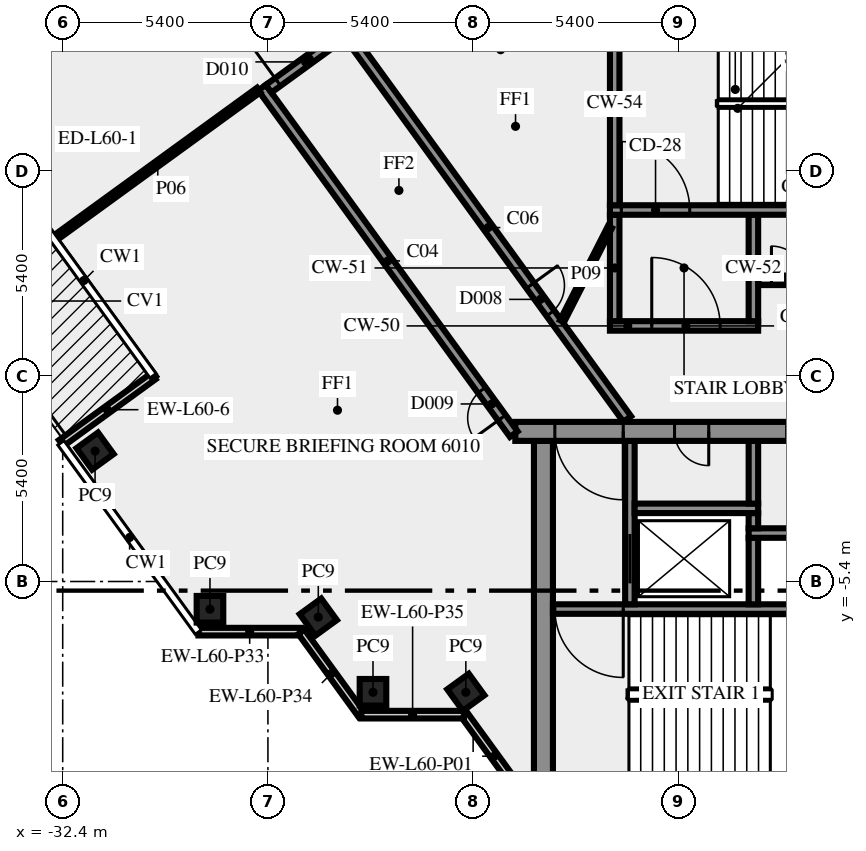
"""IFC4 building model, lengths in metres.
Left out: names, types, materials, properties, quantities, classifications, styles, units other than length and angle.
Written with IfcOpenShell. Run it as: python <this file> out.ifc"""

import sys

from ifc_helpers import new_model, si_unit, direction, frame, frame_2d, origin, origin_2d, place, context, subcontext, project, spatial, rectangle, extrude, element, fill, save


model = new_model("IFC4")
c1 = context("Model", 3, precision=1e-05, world=origin(), true_north=direction((0.0, 1.0)))
c2 = subcontext(c1, "Body", "Model", "MODEL_VIEW")
j1 = project(units=[si_unit("LENGTHUNIT", "METRE"), si_unit("PLANEANGLEUNIT", "RADIAN")], contexts=[c1])
p1 = place(None, origin())
s1 = spatial("IfcSite", under=j1, at=p1, CompositionType="ELEMENT")
p2 = place(p1, origin())
s2 = spatial("IfcBuilding", under=s1, at=p2, CompositionType="ELEMENT")
p3 = place(p2, frame((0.0, 0.0, 257.0)))
s3 = spatial("IfcBuildingStorey", under=s2, at=p3, CompositionType="ELEMENT", Elevation=257.0)
for number, where, z_axis, x_axis in (
    (1, (-31.548, -1.969, 0.0), (0.0, 0.0, 1.0), (0.588, -0.809, 0.0)),
    (2, (-28.525, -6.13, 0.0), (0.0, 0.0, 1.0), (1.0, 0.0, 0.0)),
    (3, (-25.674, -6.337, 0.0), (0.0, 0.0, 1.0), (0.588, -0.809, 0.0)),
    (4, (-24.235, -8.315, 0.0), (0.0, 0.0, 1.0), (1.0, 0.0, 0.0)),
    (5, (-21.792, -8.315, 0.0), (0.0, 0.0, 1.0), (0.588, -0.809, 0.0)),
):
    element("IfcColumn", number, at=place(p3, frame(where, z_axis=z_axis, x_axis=x_axis)), inside=s3, PredefinedType="COLUMN", context=c2, shape_type="SweptSolid", body=[
        extrude(rectangle(XDim=0.7, YDim=0.7, at=origin_2d()), origin(), (0.0, 0.0, 1.0), 3.65),
    ])
p4 = place(p3, frame((-30.014, 0.002, 0.0), z_axis=(0.0, 0.0, 1.0), x_axis=(-0.808999938455, -0.587808727036, 0.0)))
e6 = element("IfcWall", 6, at=p4, inside=s3, PredefinedType="SOLIDWALL", context=c2, shape_type="SweptSolid", body=[
    extrude(rectangle(XDim=3.0, YDim=0.2, at=frame_2d((1.5, 0.0))), origin(), (0.0, 0.0, 1.0), 3.65),
])
p5 = place(p3, frame((-21.833, -8.909, 0.0), z_axis=(0.0, 0.0, 1.0), x_axis=(0.587766567315, -0.809030569476, 0.0)))
e7 = element("IfcWall", 7, at=p5, inside=s3, PredefinedType="SOLIDWALL", context=c2, shape_type="SweptSolid", body=[
    extrude(rectangle(XDim=2.688, YDim=0.2, at=frame_2d((1.344, 0.0))), origin(), (0.0, 0.0, 1.0), 3.65),
])
p6 = place(p3, frame((-28.83, -6.719, 0.0), z_axis=(0.0, 0.0, 1.0), x_axis=(1.0, 0.0, 0.0)))
e8 = element("IfcWall", 8, at=p6, inside=s3, PredefinedType="SOLIDWALL", context=c2, shape_type="SweptSolid", body=[
    extrude(rectangle(XDim=2.7, YDim=0.2, at=frame_2d((1.35, 0.0))), origin(), (0.0, 0.0, 1.0), 3.65),
])
p7 = place(p3, frame((-26.12, -6.724, 0.0), z_axis=(0.0, 0.0, 1.0), x_axis=(0.587720002413, -0.809064397168, 0.0)))
e9 = element("IfcWall", 9, at=p7, inside=s3, PredefinedType="SOLIDWALL", context=c2, shape_type="SweptSolid", body=[
    extrude(rectangle(XDim=2.7, YDim=0.2, at=frame_2d((1.35, 0.0))), origin(), (0.0, 0.0, 1.0), 3.65),
])
p8 = place(p3, frame((-24.543, -8.904, 0.0), z_axis=(0.0, 0.0, 1.0), x_axis=(1.0, 0.0, 0.0)))
e10 = element("IfcWall", 10, at=p8, inside=s3, PredefinedType="SOLIDWALL", context=c2, shape_type="SweptSolid", body=[
    extrude(rectangle(XDim=2.7, YDim=0.2, at=frame_2d((1.35, 0.0))), origin(), (0.0, 0.0, 1.0), 3.65),
])
p9 = place(p3, frame((-19.75, -10.5, 0.0), z_axis=(0.0, 0.0, 1.0), x_axis=(0.0, 1.0, 0.0)))
e11 = element("IfcWall", 11, at=p9, inside=s3, PredefinedType="SHEAR", context=c2, shape_type="SweptSolid", body=[
    extrude(rectangle(XDim=8.8, YDim=0.5, at=frame_2d((4.4, 0.0))), origin(), (0.0, 0.0, 1.0), 3.65),
])
p10 = place(p3, frame((-11.45, -6.125, 0.0), z_axis=(0.0, 0.0, 1.0), x_axis=(-1.0, 0.0, 0.0)))
e12 = element("IfcWall", 12, at=p10, inside=s3, PredefinedType="SHEAR", context=c2, shape_type="SweptSolid", body=[
    extrude(rectangle(XDim=8.05, YDim=0.25, at=frame_2d((4.025, 0.0))), origin(), (0.0, 0.0, 1.0), 3.65),
])
p11 = place(p10, frame((6.2, 0.0, 0.0)))
e13 = element("IfcOpeningElement", 13, at=p11, cuts=e12, PredefinedType="OPENING", context=c2, shape_type="SweptSolid", body=[
    extrude(rectangle(XDim=1.8, YDim=2.1, at=frame_2d((0.9, 1.05))), frame((0.0, 0.135, 0.0), z_axis=(0.0, -1.0, 0.0), x_axis=(1.0, 0.0, 0.0)), (0.0, 0.0, 1.0), 0.27),
])
p12 = place(p3, frame((-17.475, -6.0, 0.0), z_axis=(0.0, 0.0, 1.0), x_axis=(0.0, 1.0, 0.0)))
e14 = element("IfcWall", 14, at=p12, inside=s3, PredefinedType="SHEAR", context=c2, shape_type="SweptSolid", body=[
    extrude(rectangle(XDim=4.3, YDim=0.25, at=frame_2d((2.15, 0.0))), origin(), (0.0, 0.0, 1.0), 3.65),
])
p13 = place(p12, frame((0.55, 0.0, 0.0)))
e15 = element("IfcOpeningElement", 15, at=p13, cuts=e14, PredefinedType="OPENING", context=c2, shape_type="SweptSolid", body=[
    extrude(rectangle(XDim=1.3, YDim=2.1, at=frame_2d((0.65, 1.05))), frame((0.0, 0.135, 0.0), z_axis=(0.0, -1.0, 0.0), x_axis=(1.0, 0.0, 0.0)), (0.0, 0.0, 1.0), 0.27),
])
p14 = place(p3, frame((-14.225, -6.0, 0.0), z_axis=(0.0, 0.0, 1.0), x_axis=(0.0, 1.0, 0.0)))
e16 = element("IfcWall", 16, at=p14, inside=s3, PredefinedType="SHEAR", context=c2, shape_type="SweptSolid", body=[
    extrude(rectangle(XDim=1.75, YDim=0.25, at=frame_2d((0.875, 0.0))), origin(), (0.0, 0.0, 1.0), 3.65),
])
p15 = place(p3, frame((-14.35, -4.125, 0.0), z_axis=(0.0, 0.0, 1.0), x_axis=(1.0, 0.0, 0.0)))
e17 = element("IfcWall", 17, at=p15, inside=s3, PredefinedType="SHEAR", context=c2, shape_type="SweptSolid", body=[
    extrude(rectangle(XDim=10.4, YDim=0.25, at=frame_2d((5.2, 0.0))), origin(), (0.0, 0.0, 1.0), 3.65),
])
p16 = place(p15, frame((4.75, 0.0, 0.0)))
e18 = element("IfcOpeningElement", 18, at=p16, cuts=e17, PredefinedType="OPENING", context=c2, shape_type="SweptSolid", body=[
    extrude(rectangle(XDim=1.1, YDim=2.1, at=frame_2d((0.55, 1.05))), frame((0.0, 0.135, 0.0), z_axis=(0.0, -1.0, 0.0), x_axis=(1.0, 0.0, 0.0)), (0.0, 0.0, 1.0), 0.27),
])
p17 = place(p15, frame((7.25, 0.0, 0.0)))
e19 = element("IfcOpeningElement", 19, at=p17, cuts=e17, PredefinedType="OPENING", context=c2, shape_type="SweptSolid", body=[
    extrude(rectangle(XDim=1.1, YDim=2.1, at=frame_2d((0.55, 1.05))), frame((0.0, 0.135, 0.0), z_axis=(0.0, -1.0, 0.0), x_axis=(1.0, 0.0, 0.0)), (0.0, 0.0, 1.0), 0.27),
])
p18 = place(p3, frame((-14.225, -4.0, 0.0), z_axis=(0.0, 0.0, 1.0), x_axis=(0.0, 1.0, 0.0)))
e20 = element("IfcWall", 20, at=p18, inside=s3, PredefinedType="SHEAR", context=c2, shape_type="SweptSolid", body=[
    extrude(rectangle(XDim=0.4, YDim=0.25, at=frame_2d((0.2, 0.0))), origin(), (0.0, 0.0, 1.0), 3.65),
])
p19 = place(p3, frame((-17.35, -3.475, 0.0), z_axis=(0.0, 0.0, 1.0), x_axis=(1.0, 0.0, 0.0)))
e21 = element("IfcWall", 21, at=p19, inside=s3, PredefinedType="SHEAR", context=c2, shape_type="SweptSolid", body=[
    extrude(rectangle(XDim=3.25, YDim=0.25, at=frame_2d((1.625, 0.0))), origin(), (0.0, 0.0, 1.0), 3.65),
])
p20 = place(p3, frame((-14.225, -3.35, 0.0), z_axis=(0.0, 0.0, 1.0), x_axis=(0.0, 1.0, 0.0)))
e22 = element("IfcWall", 22, at=p20, inside=s3, PredefinedType="SHEAR", context=c2, shape_type="SweptSolid", body=[
    extrude(rectangle(XDim=1.65, YDim=0.25, at=frame_2d((0.825, 0.0))), origin(), (0.0, 0.0, 1.0), 3.65),
])
p21 = place(p3, frame((20.49, -1.45, 0.0), z_axis=(0.0, 0.0, 1.0), x_axis=(-1.0, 0.0, 0.0)))
e23 = element("IfcWall", 23, at=p21, inside=s3, PredefinedType="SHEAR", context=c2, shape_type="SweptSolid", body=[
    extrude(rectangle(XDim=40.98, YDim=0.5, at=frame_2d((20.49, 0.0))), origin(), (0.0, 0.0, 1.0), 3.65),
])
p22 = place(p21, frame((38.14, 0.0, 0.0)))
e24 = element("IfcOpeningElement", 24, at=p22, cuts=e23, PredefinedType="OPENING", context=c2, shape_type="SweptSolid", body=[
    extrude(rectangle(XDim=1.8, YDim=2.1, at=frame_2d((0.9, 1.05))), frame((0.0, 0.26, 0.0), z_axis=(0.0, -1.0, 0.0), x_axis=(1.0, 0.0, 0.0)), (0.0, 0.0, 1.0), 0.52),
])
p23 = place(p21, frame((35.89, 0.0, 0.0)))
e25 = element("IfcOpeningElement", 25, at=p23, cuts=e23, PredefinedType="OPENING", context=c2, shape_type="SweptSolid", body=[
    extrude(rectangle(XDim=0.9, YDim=2.1, at=frame_2d((0.45, 1.05))), frame((0.0, 0.26, 0.0), z_axis=(0.0, -1.0, 0.0), x_axis=(1.0, 0.0, 0.0)), (0.0, 0.0, 1.0), 0.52),
])
p24 = place(p21, frame((32.94, 0.0, 0.0)))
e26 = element("IfcOpeningElement", 26, at=p24, cuts=e23, PredefinedType="OPENING", context=c2, shape_type="SweptSolid", body=[
    extrude(rectangle(XDim=0.9, YDim=2.1, at=frame_2d((0.45, 1.05))), frame((0.0, 0.26, 0.0), z_axis=(0.0, -1.0, 0.0), x_axis=(1.0, 0.0, 0.0)), (0.0, 0.0, 1.0), 0.52),
])
p25 = place(p21, frame((31.015, 0.0, 0.0)))
e27 = element("IfcOpeningElement", 27, at=p25, cuts=e23, PredefinedType="OPENING", context=c2, shape_type="SweptSolid", body=[
    extrude(rectangle(XDim=0.8, YDim=2.1, at=frame_2d((0.4, 1.05))), frame((0.0, 0.26, 0.0), z_axis=(0.0, -1.0, 0.0), x_axis=(1.0, 0.0, 0.0)), (0.0, 0.0, 1.0), 0.52),
])
p26 = place(p21, frame((24.765, 0.0, 0.0)))
e28 = element("IfcOpeningElement", 28, at=p26, cuts=e23, PredefinedType="OPENING", context=c2, shape_type="SweptSolid", body=[
    extrude(rectangle(XDim=0.8, YDim=2.1, at=frame_2d((0.4, 1.05))), frame((0.0, 0.26, 0.0), z_axis=(0.0, -1.0, 0.0), x_axis=(1.0, 0.0, 0.0)), (0.0, 0.0, 1.0), 0.52),
])
p27 = place(p21, frame((21.765, 0.0, 0.0)))
e29 = element("IfcOpeningElement", 29, at=p27, cuts=e23, PredefinedType="OPENING", context=c2, shape_type="SweptSolid", body=[
    extrude(rectangle(XDim=2.0, YDim=2.1, at=frame_2d((1.0, 1.05))), frame((0.0, 0.26, 0.0), z_axis=(0.0, -1.0, 0.0), x_axis=(1.0, 0.0, 0.0)), (0.0, 0.0, 1.0), 0.52),
])
p28 = place(p21, frame((14.202, 0.0, 0.0)))
e30 = element("IfcOpeningElement", 30, at=p28, cuts=e23, PredefinedType="OPENING", context=c2, shape_type="SweptSolid", body=[
    extrude(rectangle(XDim=0.9, YDim=2.1, at=frame_2d((0.45, 1.05))), frame((0.0, 0.26, 0.0), z_axis=(0.0, -1.0, 0.0), x_axis=(1.0, 0.0, 0.0)), (0.0, 0.0, 1.0), 0.52),
])
p29 = place(p21, frame((10.478, 0.0, 0.0)))
e31 = element("IfcOpeningElement", 31, at=p29, cuts=e23, PredefinedType="OPENING", context=c2, shape_type="SweptSolid", body=[
    extrude(rectangle(XDim=0.9, YDim=2.1, at=frame_2d((0.45, 1.05))), frame((0.0, 0.26, 0.0), z_axis=(0.0, -1.0, 0.0), x_axis=(1.0, 0.0, 0.0)), (0.0, 0.0, 1.0), 0.52),
])
p30 = place(p21, frame((7.14, 0.0, 0.0)))
e32 = element("IfcOpeningElement", 32, at=p30, cuts=e23, PredefinedType="OPENING", context=c2, shape_type="SweptSolid", body=[
    extrude(rectangle(XDim=0.9, YDim=2.1, at=frame_2d((0.45, 1.05))), frame((0.0, 0.26, 0.0), z_axis=(0.0, -1.0, 0.0), x_axis=(1.0, 0.0, 0.0)), (0.0, 0.0, 1.0), 0.52),
])
p31 = place(p21, frame((5.028, 0.0, 0.0)))
e33 = element("IfcOpeningElement", 33, at=p31, cuts=e23, PredefinedType="OPENING", context=c2, shape_type="SweptSolid", body=[
    extrude(rectangle(XDim=0.8, YDim=2.1, at=frame_2d((0.4, 1.05))), frame((0.0, 0.26, 0.0), z_axis=(0.0, -1.0, 0.0), x_axis=(1.0, 0.0, 0.0)), (0.0, 0.0, 1.0), 0.52),
])
p32 = place(p21, frame((3.452, 0.0, 0.0)))
e34 = element("IfcOpeningElement", 34, at=p32, cuts=e23, PredefinedType="OPENING", context=c2, shape_type="SweptSolid", body=[
    extrude(rectangle(XDim=0.8, YDim=2.1, at=frame_2d((0.4, 1.05))), frame((0.0, 0.26, 0.0), z_axis=(0.0, -1.0, 0.0), x_axis=(1.0, 0.0, 0.0)), (0.0, 0.0, 1.0), 0.52),
])
p33 = place(p21, frame((1.04, 0.0, 0.0)))
e35 = element("IfcOpeningElement", 35, at=p33, cuts=e23, PredefinedType="OPENING", context=c2, shape_type="SweptSolid", body=[
    extrude(rectangle(XDim=1.8, YDim=2.1, at=frame_2d((0.9, 1.05))), frame((0.0, 0.26, 0.0), z_axis=(0.0, -1.0, 0.0), x_axis=(1.0, 0.0, 0.0)), (0.0, 0.0, 1.0), 0.52),
])
p34 = place(p3, frame((-18.0, 1.325, 0.0), z_axis=(0.0, 0.0, 1.0), x_axis=(1.0, 0.0, 0.0)))
e36 = element("IfcWall", 36, at=p34, inside=s3, PredefinedType="SHEAR", context=c2, shape_type="SweptSolid", body=[
    extrude(rectangle(XDim=3.9, YDim=0.25, at=frame_2d((1.95, 0.0))), origin(), (0.0, 0.0, 1.0), 3.65),
])
p35 = place(p34, frame((1.1, 0.0, 0.0)))
e37 = element("IfcOpeningElement", 37, at=p35, cuts=e36, PredefinedType="OPENING", context=c2, shape_type="SweptSolid", body=[
    extrude(rectangle(XDim=1.8, YDim=2.1, at=frame_2d((0.9, 1.05))), frame((0.0, 0.135, 0.0), z_axis=(0.0, -1.0, 0.0), x_axis=(1.0, 0.0, 0.0)), (0.0, 0.0, 1.0), 0.27),
])
for number, where, z_axis, x_axis in (
    (38, (-17.875, 1.45, 0.0), (0.0, 0.0, 1.0), (0.0, 1.0, 0.0)),
    (39, (-14.225, 1.45, 0.0), (0.0, 0.0, 1.0), (0.0, 1.0, 0.0)),
):
    element("IfcWall", number, at=place(p3, frame(where, z_axis=z_axis, x_axis=x_axis)), inside=s3, PredefinedType="SHEAR", context=c2, shape_type="SweptSolid", body=[
        extrude(rectangle(XDim=2.8, YDim=0.25, at=frame_2d((1.4, 0.0))), origin(), (0.0, 0.0, 1.0), 3.65),
    ])
p36 = place(p3, frame((-18.0, 4.375, 0.0), z_axis=(0.0, 0.0, 1.0), x_axis=(1.0, 0.0, 0.0)))
e40 = element("IfcWall", 40, at=p36, inside=s3, PredefinedType="SHEAR", context=c2, shape_type="SweptSolid", body=[
    extrude(rectangle(XDim=10.5, YDim=0.25, at=frame_2d((5.25, 0.0))), origin(), (0.0, 0.0, 1.0), 3.65),
])
p37 = place(p36, frame((0.3, 0.0, 0.0)))
e41 = element("IfcOpeningElement", 41, at=p37, cuts=e40, PredefinedType="OPENING", context=c2, shape_type="SweptSolid", body=[
    extrude(rectangle(XDim=1.8, YDim=2.1, at=frame_2d((0.9, 1.05))), frame((0.0, 0.135, 0.0), z_axis=(0.0, -1.0, 0.0), x_axis=(1.0, 0.0, 0.0)), (0.0, 0.0, 1.0), 0.27),
])
p38 = place(p3, frame((-17.875, 4.5, 0.0), z_axis=(0.0, 0.0, 1.0), x_axis=(0.0, 1.0, 0.0)))
e42 = element("IfcWall", 42, at=p38, inside=s3, PredefinedType="SHEAR", context=c2, shape_type="SweptSolid", body=[
    extrude(rectangle(XDim=5.35, YDim=0.25, at=frame_2d((2.675, 0.0))), origin(), (0.0, 0.0, 1.0), 3.65),
])
p39 = place(p3, frame((-20.531, -1.523, 0.0), z_axis=(0.0, 0.0, 1.0), x_axis=(-0.587782646447, 0.809018887626, 0.0)))
e43 = element("IfcWall", 43, at=p39, inside=s3, PredefinedType="SOLIDWALL", context=c2, shape_type="SweptSolid", body=[
    extrude(rectangle(XDim=11.27, YDim=0.25, at=frame_2d((5.635, 0.0))), origin(), (0.0, 0.0, 1.0), 3.65),
])
p40 = place(p39, frame((0.533, 0.0, 0.0)))
e44 = element("IfcOpeningElement", 44, at=p40, cuts=e43, PredefinedType="OPENING", context=c2, shape_type="SweptSolid", body=[
    extrude(rectangle(XDim=0.9, YDim=2.1, at=frame_2d((0.45, 1.05))), frame((0.0, 0.135, 0.0), z_axis=(0.0, -1.0, 0.0), x_axis=(1.0, 0.0, 0.0)), (0.0, 0.0, 1.0), 0.27),
])
p41 = place(p3, frame((-26.981, 7.567, 0.0), z_axis=(0.0, 0.0, 1.0), x_axis=(0.809038743598, 0.587755315891, 0.0)))
e45 = element("IfcWall", 45, at=p41, inside=s3, PredefinedType="SOLIDWALL", context=c2, shape_type="SweptSolid", body=[
    extrude(rectangle(XDim=2.65, YDim=0.25, at=frame_2d((1.325, 0.0))), origin(), (0.0, 0.0, 1.0), 3.65),
])
p42 = place(p41, frame((0.3, 0.0, 0.0)))
e46 = element("IfcOpeningElement", 46, at=p42, cuts=e45, PredefinedType="OPENING", context=c2, shape_type="SweptSolid", body=[
    extrude(rectangle(XDim=1.8, YDim=2.1, at=frame_2d((0.9, 1.05))), frame((0.0, 0.135, 0.0), z_axis=(0.0, -1.0, 0.0), x_axis=(1.0, 0.0, 0.0)), (0.0, 0.0, 1.0), 0.27),
])
p43 = place(p3, frame((-24.865, 8.95, 0.0), z_axis=(0.0, 0.0, 1.0), x_axis=(0.587791617212, -0.809012369952, 0.0)))
e47 = element("IfcWall", 47, at=p43, inside=s3, PredefinedType="SOLIDWALL", context=c2, shape_type="SweptSolid", body=[
    extrude(rectangle(XDim=12.453, YDim=0.25, at=frame_2d((6.227, 0.0))), origin(), (0.0, 0.0, 1.0), 3.65),
])
p44 = place(p43, frame((8.112, 0.0, 0.0)))
e48 = element("IfcOpeningElement", 48, at=p44, cuts=e47, PredefinedType="OPENING", context=c2, shape_type="SweptSolid", body=[
    extrude(rectangle(XDim=0.9, YDim=2.1, at=frame_2d((0.45, 1.05))), frame((0.0, 0.135, 0.0), z_axis=(0.0, -1.0, 0.0), x_axis=(1.0, 0.0, 0.0)), (0.0, 0.0, 1.0), 0.27),
])
p45 = place(p3, frame((-14.09, 2.525, 0.0), z_axis=(0.0, 0.0, 1.0), x_axis=(1.0, 0.0, 0.0)))
e49 = element("IfcWall", 49, at=p45, inside=s3, PredefinedType="SOLIDWALL", context=c2, shape_type="SweptSolid", body=[
    extrude(rectangle(XDim=8.84, YDim=0.25, at=frame_2d((4.42, 0.0))), origin(), (0.0, 0.0, 1.0), 3.65),
])
p46 = place(p45, frame((0.34, 0.0, 0.0)))
e50 = element("IfcOpeningElement", 50, at=p46, cuts=e49, PredefinedType="OPENING", context=c2, shape_type="SweptSolid", body=[
    extrude(rectangle(XDim=0.9, YDim=2.1, at=frame_2d((0.45, 1.05))), frame((0.0, 0.135, 0.0), z_axis=(0.0, -1.0, 0.0), x_axis=(1.0, 0.0, 0.0)), (0.0, 0.0, 1.0), 0.27),
])
p47 = place(p3, frame((-32.556, 3.671, 0.0), z_axis=(0.0, 0.0, 1.0), x_axis=(0.809057351259, 0.587729701796, 0.0)))
e51 = element("IfcWall", 51, at=p47, inside=s3, PredefinedType="PARTITIONING", context=c2, shape_type="SweptSolid", body=[
    extrude(rectangle(XDim=6.57, YDim=0.15, at=frame_2d((3.285, 0.0))), origin(), (0.0, 0.0, 1.0), 3.65),
])
p48 = place(p3, frame((-19.261, 1.45, 0.0), z_axis=(0.0, 0.0, 1.0), x_axis=(0.453950796792, 0.891026752736, 0.0)))
e52 = element("IfcWall", 52, at=p48, inside=s3, PredefinedType="PARTITIONING", context=c2, shape_type="SweptSolid", body=[
    extrude(rectangle(XDim=2.778, YDim=0.12, at=frame_2d((1.389, 0.0))), origin(), (0.0, 0.0, 1.0), 3.65),
])
p49 = place(p11, origin())
e53 = element("IfcDoor", 53, at=p49, inside=s3, OperationType="DOUBLE_DOOR_SINGLE_SWING", PredefinedType="DOOR", context=c2, shape_type="SweptSolid", body=[
    extrude(rectangle(XDim=1.8, YDim=2.1, at=frame_2d((0.9, 1.05))), frame((0.0, 0.025, 0.0), z_axis=(0.0, -1.0, 0.0), x_axis=(1.0, 0.0, 0.0)), (0.0, 0.0, 1.0), 0.05),
])
fill(e13, e53)
p50 = place(p13, origin())
e54 = element("IfcDoor", 54, at=p50, inside=s3, OperationType="DOUBLE_DOOR_SLIDING", PredefinedType="DOOR", context=c2, shape_type="SweptSolid", body=[
    extrude(rectangle(XDim=1.3, YDim=2.1, at=frame_2d((0.65, 1.05))), frame((0.0, 0.025, 0.0), z_axis=(0.0, -1.0, 0.0), x_axis=(1.0, 0.0, 0.0)), (0.0, 0.0, 1.0), 0.05),
])
fill(e15, e54)
p51 = place(p22, origin())
e55 = element("IfcDoor", 55, at=p51, inside=s3, OperationType="DOUBLE_DOOR_SINGLE_SWING", PredefinedType="DOOR", context=c2, shape_type="SweptSolid", body=[
    extrude(rectangle(XDim=1.8, YDim=2.1, at=frame_2d((0.9, 1.05))), frame((0.0, 0.025, 0.0), z_axis=(0.0, -1.0, 0.0), x_axis=(1.0, 0.0, 0.0)), (0.0, 0.0, 1.0), 0.05),
])
fill(e24, e55)
p52 = place(p23, origin())
e56 = element("IfcDoor", 56, at=p52, inside=s3, OperationType="SINGLE_SWING_RIGHT", PredefinedType="DOOR", context=c2, shape_type="SweptSolid", body=[
    extrude(rectangle(XDim=0.9, YDim=2.1, at=frame_2d((0.45, 1.05))), frame((0.0, 0.025, 0.0), z_axis=(0.0, -1.0, 0.0), x_axis=(1.0, 0.0, 0.0)), (0.0, 0.0, 1.0), 0.05),
])
fill(e25, e56)
p53 = place(p35, origin())
e57 = element("IfcDoor", 57, at=p53, inside=s3, OperationType="DOUBLE_DOOR_SINGLE_SWING", PredefinedType="DOOR", context=c2, shape_type="SweptSolid", body=[
    extrude(rectangle(XDim=1.8, YDim=2.1, at=frame_2d((0.9, 1.05))), frame((0.0, 0.025, 0.0), z_axis=(0.0, -1.0, 0.0), x_axis=(1.0, 0.0, 0.0)), (0.0, 0.0, 1.0), 0.05),
])
fill(e37, e57)
p54 = place(p37, origin())
e58 = element("IfcDoor", 58, at=p54, inside=s3, OperationType="DOUBLE_DOOR_SINGLE_SWING", PredefinedType="DOOR", context=c2, shape_type="SweptSolid", body=[
    extrude(rectangle(XDim=1.8, YDim=2.1, at=frame_2d((0.9, 1.05))), frame((0.0, 0.025, 0.0), z_axis=(0.0, -1.0, 0.0), x_axis=(1.0, 0.0, 0.0)), (0.0, 0.0, 1.0), 0.05),
])
fill(e41, e58)
p55 = place(p44, origin())
e59 = element("IfcDoor", 59, at=p55, inside=s3, OperationType="SINGLE_SWING_RIGHT", PredefinedType="DOOR", context=c2, shape_type="SweptSolid", body=[
    extrude(rectangle(XDim=0.9, YDim=2.1, at=frame_2d((0.45, 1.05))), frame((0.0, 0.025, 0.0), z_axis=(0.0, -1.0, 0.0), x_axis=(1.0, 0.0, 0.0)), (0.0, 0.0, 1.0), 0.05),
])
fill(e48, e59)
p56 = place(p42, origin())
e60 = element("IfcDoor", 60, at=p56, inside=s3, OperationType="DOUBLE_DOOR_SINGLE_SWING", PredefinedType="DOOR", context=c2, shape_type="SweptSolid", body=[
    extrude(rectangle(XDim=1.8, YDim=2.1, at=frame_2d((0.9, 1.05))), frame((0.0, 0.025, 0.0), z_axis=(0.0, -1.0, 0.0), x_axis=(1.0, 0.0, 0.0)), (0.0, 0.0, 1.0), 0.05),
])
fill(e46, e60)
p57 = place(p46, origin())
e61 = element("IfcDoor", 61, at=p57, inside=s3, OperationType="SINGLE_SWING_LEFT", PredefinedType="DOOR", context=c2, shape_type="SweptSolid", body=[
    extrude(rectangle(XDim=0.9, YDim=2.1, at=frame_2d((0.45, 1.05))), frame((0.0, 0.025, 0.0), z_axis=(0.0, -1.0, 0.0), x_axis=(1.0, 0.0, 0.0)), (0.0, 0.0, 1.0), 0.05),
])
fill(e50, e61)
p58 = place(p40, origin())
e62 = element("IfcDoor", 62, at=p58, inside=s3, OperationType="SINGLE_SWING_LEFT", PredefinedType="DOOR", context=c2, shape_type="SweptSolid", body=[
    extrude(rectangle(XDim=0.9, YDim=2.1, at=frame_2d((0.45, 1.05))), frame((0.0, 0.025, 0.0), z_axis=(0.0, -1.0, 0.0), x_axis=(1.0, 0.0, 0.0)), (0.0, 0.0, 1.0), 0.05),
])
fill(e44, e62)
save(model, sys.argv[1])
